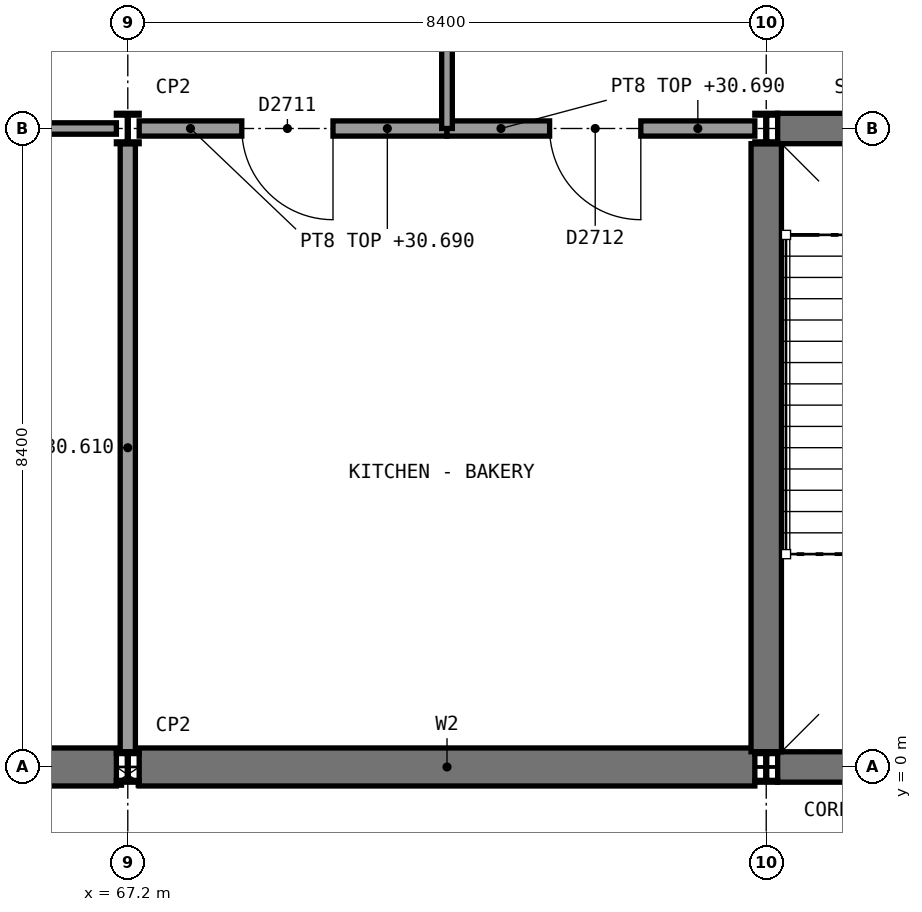
"""IFC4 building model, lengths in metres.
Left out: names, types, materials, properties, quantities, classifications, styles, units other than length and angle.
Written with IfcOpenShell. Run it as: python <this file> out.ifc"""

import sys

from ifc_helpers import new_model, si_unit, direction, frame, frame_2d, origin, origin_2d, place, context, subcontext, project, spatial, rectangle, i_section, extrude, element, fill, save


model = new_model("IFC4")
c1 = context("Model", 3, precision=1e-05, world=origin(), true_north=direction((0.0, 1.0)))
c2 = subcontext(c1, "Body", "Model", "MODEL_VIEW")
j1 = project(units=[si_unit("LENGTHUNIT", "METRE"), si_unit("PLANEANGLEUNIT", "RADIAN")], contexts=[c1])
p1 = place(None, origin())
s1 = spatial("IfcSite", under=j1, at=p1, CompositionType="ELEMENT")
p2 = place(p1, origin())
s2 = spatial("IfcBuilding", under=s1, at=p2, CompositionType="ELEMENT")
p3 = place(p2, frame((0.0, 0.0, 25.8)))
s3 = spatial("IfcBuildingStorey", under=s2, at=p3, CompositionType="ELEMENT", Elevation=25.8)
p4 = place(p3, frame((58.95, 0.0, 0.0), z_axis=(0.0, 0.0, 1.0), x_axis=(1.0, 0.0, 0.0)))
e1 = element("IfcWall", 1, at=p4, inside=s3, PredefinedType="SHEAR", context=c2, shape_type="SweptSolid", body=[
    extrude(rectangle(XDim=8.1, YDim=0.5, at=frame_2d((4.05, 0.0))), origin(), (0.0, 0.0, 1.0), 5.2),
])
p5 = place(p3, frame((67.35, 0.0, 0.0), z_axis=(0.0, 0.0, 1.0), x_axis=(1.0, 0.0, 0.0)))
e2 = element("IfcWall", 2, at=p5, inside=s3, PredefinedType="SHEAR", context=c2, shape_type="SweptSolid", body=[
    extrude(rectangle(XDim=8.1, YDim=0.5, at=frame_2d((4.05, 0.0))), origin(), (0.0, 0.0, 1.0), 5.2),
])
p6 = place(p3, frame((75.75, 0.0, 0.0), z_axis=(0.0, 0.0, 1.0), x_axis=(1.0, 0.0, 0.0)))
e3 = element("IfcWall", 3, at=p6, inside=s3, PredefinedType="SHEAR", context=c2, shape_type="SweptSolid", body=[
    extrude(rectangle(XDim=8.1, YDim=0.4, at=frame_2d((4.05, 0.0))), origin(), (0.0, 0.0, 1.0), 4.51),
])
p7 = place(p3, frame((75.75, 8.4, 0.0), z_axis=(0.0, 0.0, 1.0), x_axis=(1.0, 0.0, 0.0)))
e4 = element("IfcWall", 4, at=p7, inside=s3, PredefinedType="SHEAR", context=c2, shape_type="SweptSolid", body=[
    extrude(rectangle(XDim=8.1, YDim=0.4, at=frame_2d((4.05, 0.0))), origin(), (0.0, 0.0, 1.0), 4.51),
])
p8 = place(p7, frame((1.15, 0.0, 0.0)))
e5 = element("IfcOpeningElement", 5, at=p8, cuts=e4, PredefinedType="OPENING", context=c2, shape_type="SweptSolid", body=[
    extrude(rectangle(XDim=1.8, YDim=2.1, at=frame_2d((0.9, 1.05))), frame((0.0, 0.21, 0.0), z_axis=(0.0, -1.0, 0.0), x_axis=(1.0, 0.0, 0.0)), (0.0, 0.0, 1.0), 0.42),
])
p9 = place(p7, frame((5.3, 0.0, 0.0)))
e6 = element("IfcOpeningElement", 6, at=p9, cuts=e4, PredefinedType="OPENING", context=c2, shape_type="SweptSolid", body=[
    extrude(rectangle(XDim=1.8, YDim=2.1, at=frame_2d((0.9, 1.05))), frame((0.0, 0.21, 0.0), z_axis=(0.0, -1.0, 0.0), x_axis=(1.0, 0.0, 0.0)), (0.0, 0.0, 1.0), 0.42),
])
p10 = place(p3, frame((75.6, 0.2, 0.0), z_axis=(0.0, 0.0, 1.0), x_axis=(0.0, 1.0, 0.0)))
e7 = element("IfcWall", 7, at=p10, inside=s3, PredefinedType="SHEAR", context=c2, shape_type="SweptSolid", body=[
    extrude(rectangle(XDim=8.0, YDim=0.4, at=frame_2d((4.0, 0.0))), origin(), (0.0, 0.0, 1.0), 5.2),
])
for number, where, z_axis, x_axis in (
    (8, (67.2, 0.0, 0.0), (0.0, 0.0, 1.0), (1.0, 0.0, 0.0)),
    (9, (67.2, 8.4, 0.0), (0.0, 0.0, 1.0), (1.0, 0.0, 0.0)),
    (10, (75.6, 0.0, 0.0), (0.0, 0.0, 1.0), (1.0, 0.0, 0.0)),
    (11, (75.6, 8.4, 0.0), (0.0, 0.0, 1.0), (1.0, 0.0, 0.0)),
):
    element("IfcColumn", number, at=place(p3, frame(where, z_axis=z_axis, x_axis=x_axis)), inside=s3, PredefinedType="COLUMN", context=c2, shape_type="SweptSolid", body=[
        extrude(i_section(OverallWidth=0.3, OverallDepth=0.4, WebThickness=0.013, FlangeThickness=0.024, FilletRadius=0.027, at=origin_2d()), origin(), (0.0, 0.0, 1.0), 5.4),
    ])
p11 = place(p3, frame((67.2, 0.2, 0.0), z_axis=(0.0, 0.0, 1.0), x_axis=(0.0, 1.0, 0.0)))
e12 = element("IfcWall", 12, at=p11, inside=s3, PredefinedType="SOLIDWALL", context=c2, shape_type="SweptSolid", body=[
    extrude(rectangle(XDim=8.0, YDim=0.2, at=frame_2d((4.0, 0.0))), origin(), (0.0, 0.0, 1.0), 4.81),
])
p12 = place(p3, frame((58.95, 8.4, 0.0), z_axis=(0.0, 0.0, 1.0), x_axis=(1.0, 0.0, 0.0)))
e13 = element("IfcWall", 13, at=p12, inside=s3, PredefinedType="SOLIDWALL", context=c2, shape_type="SweptSolid", body=[
    extrude(rectangle(XDim=8.1, YDim=0.15, at=frame_2d((4.05, 0.0))), origin(), (0.0, 0.0, 1.0), 4.89),
])
p13 = place(p12, frame((3.35, 0.0, 0.0)))
e14 = element("IfcOpeningElement", 14, at=p13, cuts=e13, PredefinedType="OPENING", context=c2, shape_type="SweptSolid", body=[
    extrude(rectangle(XDim=1.5, YDim=2.1, at=frame_2d((0.75, 1.05))), frame((0.0, 0.085, 0.0), z_axis=(0.0, -1.0, 0.0), x_axis=(1.0, 0.0, 0.0)), (0.0, 0.0, 1.0), 0.17),
])
p14 = place(p3, frame((67.35, 8.4, 0.0), z_axis=(0.0, 0.0, 1.0), x_axis=(1.0, 0.0, 0.0)))
e15 = element("IfcWall", 15, at=p14, inside=s3, PredefinedType="SOLIDWALL", context=c2, shape_type="SweptSolid", body=[
    extrude(rectangle(XDim=4.05, YDim=0.2, at=frame_2d((2.025, 0.0))), origin(), (0.0, 0.0, 1.0), 4.89),
])
p15 = place(p14, frame((1.35, 0.0, 0.0)))
e16 = element("IfcOpeningElement", 16, at=p15, cuts=e15, PredefinedType="OPENING", context=c2, shape_type="SweptSolid", body=[
    extrude(rectangle(XDim=1.2, YDim=2.1, at=frame_2d((0.6, 1.05))), frame((0.0, 0.11, 0.0), z_axis=(0.0, -1.0, 0.0), x_axis=(1.0, 0.0, 0.0)), (0.0, 0.0, 1.0), 0.22),
])
p16 = place(p3, frame((71.4, 8.4, 0.0), z_axis=(0.0, 0.0, 1.0), x_axis=(1.0, 0.0, 0.0)))
e17 = element("IfcWall", 17, at=p16, inside=s3, PredefinedType="SOLIDWALL", context=c2, shape_type="SweptSolid", body=[
    extrude(rectangle(XDim=4.05, YDim=0.2, at=frame_2d((2.025, 0.0))), origin(), (0.0, 0.0, 1.0), 4.89),
])
p17 = place(p16, frame((1.35, 0.0, 0.0)))
e18 = element("IfcOpeningElement", 18, at=p17, cuts=e17, PredefinedType="OPENING", context=c2, shape_type="SweptSolid", body=[
    extrude(rectangle(XDim=1.2, YDim=2.1, at=frame_2d((0.6, 1.05))), frame((0.0, 0.11, 0.0), z_axis=(0.0, -1.0, 0.0), x_axis=(1.0, 0.0, 0.0)), (0.0, 0.0, 1.0), 0.22),
])
p18 = place(p3, frame((71.4, 8.4, 0.0), z_axis=(0.0, 0.0, 1.0), x_axis=(0.0, 1.0, 0.0)))
e19 = element("IfcWall", 19, at=p18, inside=s3, PredefinedType="PARTITIONING", context=c2, shape_type="SweptSolid", body=[
    extrude(rectangle(XDim=7.6, YDim=0.14, at=frame_2d((3.8, 0.0))), origin(), (0.0, 0.0, 1.0), 5.2),
])
p19 = place(p15, frame((1.2, 0.0, 0.0), z_axis=(0.0, 0.0, 1.0), x_axis=(-1.0, 0.0, 0.0)))
e20 = element("IfcDoor", 20, at=p19, inside=s3, OperationType="SINGLE_SWING_LEFT", PredefinedType="DOOR", context=c2, shape_type="SweptSolid", body=[
    extrude(rectangle(XDim=1.2, YDim=2.1, at=frame_2d((0.6, 1.05))), frame((0.0, 0.025, 0.0), z_axis=(0.0, -1.0, 0.0), x_axis=(1.0, 0.0, 0.0)), (0.0, 0.0, 1.0), 0.05),
])
fill(e16, e20)
p20 = place(p17, frame((1.2, 0.0, 0.0), z_axis=(0.0, 0.0, 1.0), x_axis=(-1.0, 0.0, 0.0)))
e21 = element("IfcDoor", 21, at=p20, inside=s3, OperationType="SINGLE_SWING_LEFT", PredefinedType="DOOR", context=c2, shape_type="SweptSolid", body=[
    extrude(rectangle(XDim=1.2, YDim=2.1, at=frame_2d((0.6, 1.05))), frame((0.0, 0.025, 0.0), z_axis=(0.0, -1.0, 0.0), x_axis=(1.0, 0.0, 0.0)), (0.0, 0.0, 1.0), 0.05),
])
fill(e18, e21)
save(model, sys.argv[1])
